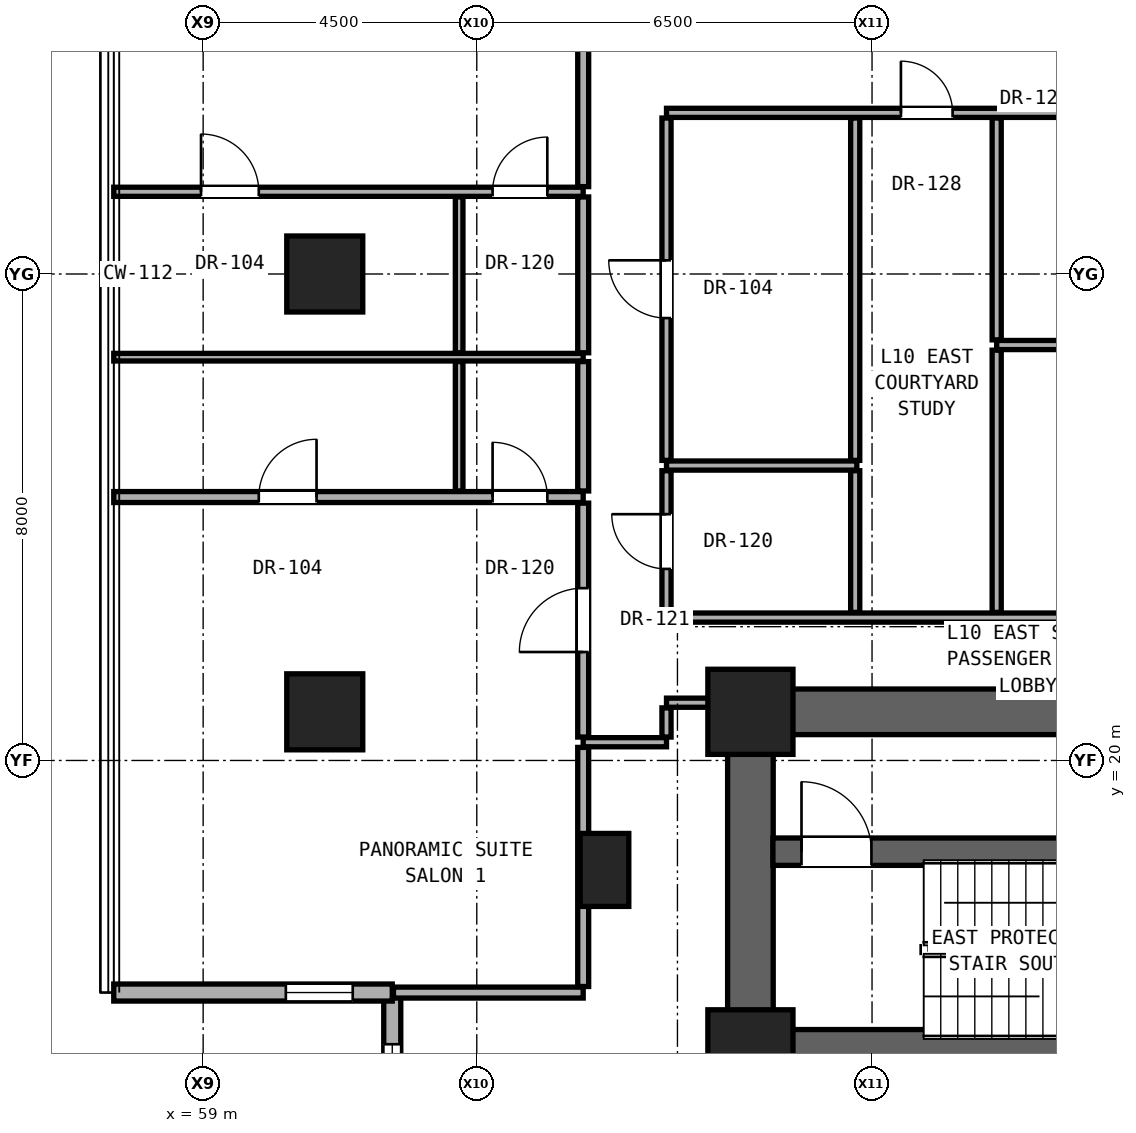
"""IFC4 building model, lengths in metres.
Left out: names, types, materials, properties, quantities, classifications, styles, units other than length and angle.
Written with IfcOpenShell. Run it as: python <this file> out.ifc"""

import sys

from ifc_helpers import new_model, si_unit, direction, frame, frame_2d, origin, origin_2d, place, context, subcontext, project, spatial, rectangle, hollow_rectangle, extrude, element, fill, save


model = new_model("IFC4")
c1 = context("Model", 3, precision=1e-05, world=origin(), true_north=direction((0.0, 1.0)))
c2 = subcontext(c1, "Body", "Model", "MODEL_VIEW")
j1 = project(units=[si_unit("LENGTHUNIT", "METRE"), si_unit("PLANEANGLEUNIT", "RADIAN")], contexts=[c1])
p1 = place(None, origin())
s1 = spatial("IfcSite", under=j1, at=p1, CompositionType="ELEMENT")
p2 = place(p1, origin())
s2 = spatial("IfcBuilding", under=s1, at=p2, CompositionType="ELEMENT")
p3 = place(p2, frame((0.0, 0.0, 38.9)))
s3 = spatial("IfcBuildingStorey", under=s2, at=p3, CompositionType="ELEMENT", Elevation=38.9)
for number, where, z_axis, x_axis in (
    (1, (68.0, 15.2, 0.0), (0.0, 0.0, 1.0), (1.0, 0.0, 0.0)),
    (2, (68.0, 20.8, 0.0), (0.0, 0.0, 1.0), (1.0, 0.0, 0.0)),
):
    element("IfcColumn", number, at=place(p3, frame(where, z_axis=z_axis, x_axis=x_axis)), inside=s3, PredefinedType="COLUMN", context=c2, shape_type="SweptSolid", body=[
        extrude(rectangle(XDim=1.4, YDim=1.4, at=origin_2d()), origin(), (0.0, 0.0, 1.0), 3.3),
    ])
for number, where, z_axis, x_axis in (
    (3, (61.0, 20.8, 0.0), (0.0, 0.0, 1.0), (1.0, 0.0, 0.0)),
    (4, (61.0, 28.0, 0.0), (0.0, 0.0, 1.0), (1.0, 0.0, 0.0)),
):
    element("IfcColumn", number, at=place(p3, frame(where, z_axis=z_axis, x_axis=x_axis)), inside=s3, PredefinedType="COLUMN", context=c2, shape_type="SweptSolid", body=[
        extrude(hollow_rectangle(XDim=1.25, YDim=1.25, WallThickness=0.07, at=origin_2d()), origin(), (0.0, 0.0, 1.0), 3.3),
    ])
p4 = place(p3, frame((65.6, 18.2, 0.0), z_axis=(0.0, 0.0, 1.0), x_axis=(1.0, 0.0, 0.0)))
e5 = element("IfcColumn", 5, at=p4, inside=s3, PredefinedType="PILASTER", context=c2, shape_type="SweptSolid", body=[
    extrude(rectangle(XDim=0.8, YDim=1.2, at=origin_2d()), origin(), (0.0, 0.0, 1.0), 3.3),
])
p5 = place(p3, frame((68.0, 15.2, 0.0), z_axis=(0.0, 0.0, 1.0), x_axis=(1.0, 0.0, 0.0)))
e6 = element("IfcWall", 6, at=p5, inside=s3, PredefinedType="SHEAR", context=c2, shape_type="SweptSolid", body=[
    extrude(rectangle(XDim=17.0, YDim=0.75, at=frame_2d((8.5, 0.0))), origin(), (0.0, 0.0, 1.0), 3.06),
])
p6 = place(p3, frame((68.0, 15.2, 0.0), z_axis=(0.0, 0.0, 1.0), x_axis=(0.0, 1.0, 0.0)))
e7 = element("IfcWall", 7, at=p6, inside=s3, PredefinedType="SHEAR", context=c2, shape_type="SweptSolid", body=[
    extrude(rectangle(XDim=5.6, YDim=0.75, at=frame_2d((2.8, 0.0))), origin(), (0.0, 0.0, 1.0), 3.06),
])
p7 = place(p3, frame((68.0, 20.8, 0.0), z_axis=(0.0, 0.0, 1.0), x_axis=(1.0, 0.0, 0.0)))
e8 = element("IfcWall", 8, at=p7, inside=s3, PredefinedType="SHEAR", context=c2, shape_type="SweptSolid", body=[
    extrude(rectangle(XDim=17.0, YDim=0.75, at=frame_2d((8.5, 0.0))), origin(), (0.0, 0.0, 1.0), 3.06),
])
p8 = place(p7, frame((9.55, 0.0, 0.0)))
e9 = element("IfcOpeningElement", 9, at=p8, cuts=e8, PredefinedType="OPENING", context=c2, shape_type="SweptSolid", body=[
    extrude(rectangle(XDim=1.3, YDim=2.3, at=frame_2d((0.65, 1.15))), frame((0.0, 0.385, 0.0), z_axis=(0.0, -1.0, 0.0), x_axis=(1.0, 0.0, 0.0)), (0.0, 0.0, 1.0), 0.77),
])
p9 = place(p7, frame((12.05, 0.0, 0.0)))
e10 = element("IfcOpeningElement", 10, at=p9, cuts=e8, PredefinedType="OPENING", context=c2, shape_type="SweptSolid", body=[
    extrude(rectangle(XDim=1.3, YDim=2.3, at=frame_2d((0.65, 1.15))), frame((0.0, 0.385, 0.0), z_axis=(0.0, -1.0, 0.0), x_axis=(1.0, 0.0, 0.0)), (0.0, 0.0, 1.0), 0.77),
])
p10 = place(p3, frame((62.11, 16.184, 0.0), z_axis=(0.0, 0.0, 1.0), x_axis=(0.0, -1.0, 0.0)))
e11 = element("IfcWall", 11, at=p10, inside=s3, PredefinedType="SOLIDWALL", context=c2, shape_type="SweptSolid", body=[
    extrude(rectangle(XDim=4.58, YDim=0.28, at=frame_2d((2.29, 0.0))), origin(), (0.0, 0.0, 1.0), 3.04),
])
p11 = place(p10, frame((0.85, 0.0, 0.79)))
e12 = element("IfcOpeningElement", 12, at=p11, cuts=e11, PredefinedType="OPENING", context=c2, shape_type="SweptSolid", body=[
    extrude(rectangle(XDim=1.5, YDim=2.1, at=frame_2d((0.75, 1.05))), frame((0.0, 0.15, 0.0), z_axis=(0.0, -1.0, 0.0), x_axis=(1.0, 0.0, 0.0)), (0.0, 0.0, 1.0), 0.3),
])
p12 = place(p3, frame((57.53, 16.184, 0.0), z_axis=(0.0, 0.0, 1.0), x_axis=(1.0, 0.0, 0.0)))
e13 = element("IfcWall", 13, at=p12, inside=s3, PredefinedType="SOLIDWALL", context=c2, shape_type="SweptSolid", body=[
    extrude(rectangle(XDim=4.58, YDim=0.28, at=frame_2d((2.29, 0.0))), origin(), (0.0, 0.0, 1.0), 3.04),
])
p13 = place(p12, frame((2.83, 0.0, 0.85)))
e14 = element("IfcOpeningElement", 14, at=p13, cuts=e13, PredefinedType="OPENING", context=c2, shape_type="SweptSolid", body=[
    extrude(rectangle(XDim=1.1, YDim=2.0, at=frame_2d((0.55, 1.0))), frame((0.0, 0.15, 0.0), z_axis=(0.0, -1.0, 0.0), x_axis=(1.0, 0.0, 0.0)), (0.0, 0.0, 1.0), 0.3),
])
p14 = place(p3, frame((62.13, 16.183, 0.0), z_axis=(0.0, 0.0, 1.0), x_axis=(1.0, 0.0, 0.0)))
e15 = element("IfcWall", 15, at=p14, inside=s3, PredefinedType="PARTITIONING", context=c2, shape_type="SweptSolid", body=[
    extrude(rectangle(XDim=3.12, YDim=0.18, at=frame_2d((1.56, 0.0))), origin(), (0.0, 0.0, 1.0), 3.06),
])
p15 = place(p3, frame((68.37, 18.5, 0.0), z_axis=(0.0, 0.0, 1.0), x_axis=(1.0, 0.0, 0.0)))
e16 = element("IfcWall", 16, at=p15, inside=s3, PredefinedType="SHEAR", context=c2, shape_type="SweptSolid", body=[
    extrude(rectangle(XDim=8.85, YDim=0.45, at=frame_2d((4.425, 0.0))), origin(), (0.0, 0.0, 1.0), 3.06),
])
p16 = place(p15, frame((0.47, 0.0, 0.0)))
e17 = element("IfcOpeningElement", 17, at=p16, cuts=e16, PredefinedType="OPENING", context=c2, shape_type="SweptSolid", body=[
    extrude(rectangle(XDim=1.15, YDim=2.2, at=frame_2d((0.575, 1.1))), frame((0.0, 0.235, 0.0), z_axis=(0.0, -1.0, 0.0), x_axis=(1.0, 0.0, 0.0)), (0.0, 0.0, 1.0), 0.47),
])
p17 = place(p3, frame((65.25, 20.3, 0.0), z_axis=(0.0, 0.0, 1.0), x_axis=(1.0, 0.0, 0.0)))
e18 = element("IfcWall", 18, at=p17, inside=s3, PredefinedType="PARTITIONING", context=c2, shape_type="SweptSolid", body=[
    extrude(rectangle(XDim=1.37, YDim=0.15, at=frame_2d((0.685, 0.0))), origin(), (0.0, 0.0, 1.0), 3.06),
])
p18 = place(p3, frame((66.62, 20.95, 0.0), z_axis=(0.0, 0.0, 1.0), x_axis=(1.0, 0.0, 0.0)))
e19 = element("IfcWall", 19, at=p18, inside=s3, PredefinedType="PARTITIONING", context=c2, shape_type="SweptSolid", body=[
    extrude(rectangle(XDim=1.01, YDim=0.15, at=frame_2d((0.505, 0.0))), origin(), (0.0, 0.0, 1.0), 2.452),
])
p19 = place(p3, frame((66.62, 22.35, 0.0), z_axis=(0.0, 0.0, 1.0), x_axis=(1.0, 0.0, 0.0)))
e20 = element("IfcWall", 20, at=p19, inside=s3, PredefinedType="PARTITIONING", context=c2, shape_type="SweptSolid", body=[
    extrude(rectangle(XDim=19.63, YDim=0.15, at=frame_2d((9.815, 0.0))), origin(), (0.0, 0.0, 1.0), 2.125),
])
p20 = place(p19, frame((12.085, 0.0, 0.0)))
e21 = element("IfcOpeningElement", 21, at=p20, cuts=e20, PredefinedType="OPENING", context=c2, shape_type="SweptSolid", body=[
    extrude(rectangle(XDim=0.85, YDim=2.01, at=frame_2d((0.425, 1.005))), frame((0.0, 0.085, 0.0), z_axis=(0.0, -1.0, 0.0), x_axis=(1.0, 0.0, 0.0)), (0.0, 0.0, 1.0), 0.17),
])
p21 = place(p3, frame((57.53, 24.332, 0.0), z_axis=(0.0, 0.0, 1.0), x_axis=(1.0, 0.0, 0.0)))
e22 = element("IfcWall", 22, at=p21, inside=s3, PredefinedType="PARTITIONING", context=c2, shape_type="SweptSolid", body=[
    extrude(rectangle(XDim=7.72, YDim=0.18, at=frame_2d((3.86, 0.0))), origin(), (0.0, 0.0, 1.0), 2.196),
])
p22 = place(p21, frame((2.385, 0.0, 0.0)))
e23 = element("IfcOpeningElement", 23, at=p22, cuts=e22, PredefinedType="OPENING", context=c2, shape_type="SweptSolid", body=[
    extrude(rectangle(XDim=0.95, YDim=2.15, at=frame_2d((0.475, 1.075))), frame((0.0, 0.1, 0.0), z_axis=(0.0, -1.0, 0.0), x_axis=(1.0, 0.0, 0.0)), (0.0, 0.0, 1.0), 0.2),
])
p23 = place(p21, frame((6.23, 0.0, 0.0)))
e24 = element("IfcOpeningElement", 24, at=p23, cuts=e22, PredefinedType="OPENING", context=c2, shape_type="SweptSolid", body=[
    extrude(rectangle(XDim=0.9, YDim=2.1, at=frame_2d((0.45, 1.05))), frame((0.0, 0.1, 0.0), z_axis=(0.0, -1.0, 0.0), x_axis=(1.0, 0.0, 0.0)), (0.0, 0.0, 1.0), 0.2),
])
p24 = place(p3, frame((66.62, 24.85, 0.0), z_axis=(0.0, 0.0, 1.0), x_axis=(1.0, 0.0, 0.0)))
e25 = element("IfcWall", 25, at=p24, inside=s3, PredefinedType="PARTITIONING", context=c2, shape_type="SweptSolid", body=[
    extrude(rectangle(XDim=3.13, YDim=0.15, at=frame_2d((1.565, 0.0))), origin(), (0.0, 0.0, 1.0), 2.125),
])
p25 = place(p3, frame((57.53, 26.632, 0.0), z_axis=(0.0, 0.0, 1.0), x_axis=(1.0, 0.0, 0.0)))
e26 = element("IfcWall", 26, at=p25, inside=s3, PredefinedType="PARTITIONING", context=c2, shape_type="SweptSolid", body=[
    extrude(rectangle(XDim=7.72, YDim=0.125, at=frame_2d((3.86, 0.0))), origin(), (0.0, 0.0, 1.0), 2.196),
])
p26 = place(p3, frame((72.05, 26.832, 0.0), z_axis=(0.0, 0.0, 1.0), x_axis=(1.0, 0.0, 0.0)))
e27 = element("IfcWall", 27, at=p26, inside=s3, PredefinedType="PARTITIONING", context=c2, shape_type="SweptSolid", body=[
    extrude(rectangle(XDim=14.2, YDim=0.15, at=frame_2d((7.1, 0.0))), origin(), (0.0, 0.0, 1.0), 2.125),
])
p27 = place(p3, frame((57.53, 29.352, 0.0), z_axis=(0.0, 0.0, 1.0), x_axis=(1.0, 0.0, 0.0)))
e28 = element("IfcWall", 28, at=p27, inside=s3, PredefinedType="PARTITIONING", context=c2, shape_type="SweptSolid", body=[
    extrude(rectangle(XDim=7.72, YDim=0.15, at=frame_2d((3.86, 0.0))), origin(), (0.0, 0.0, 1.0), 2.196),
])
p28 = place(p27, frame((1.435, 0.0, 0.0)))
e29 = element("IfcOpeningElement", 29, at=p28, cuts=e28, PredefinedType="OPENING", context=c2, shape_type="SweptSolid", body=[
    extrude(rectangle(XDim=0.95, YDim=2.15, at=frame_2d((0.475, 1.075))), frame((0.0, 0.085, 0.0), z_axis=(0.0, -1.0, 0.0), x_axis=(1.0, 0.0, 0.0)), (0.0, 0.0, 1.0), 0.17),
])
p29 = place(p27, frame((6.23, 0.0, 0.0)))
e30 = element("IfcOpeningElement", 30, at=p29, cuts=e28, PredefinedType="OPENING", context=c2, shape_type="SweptSolid", body=[
    extrude(rectangle(XDim=0.9, YDim=2.1, at=frame_2d((0.45, 1.05))), frame((0.0, 0.085, 0.0), z_axis=(0.0, -1.0, 0.0), x_axis=(1.0, 0.0, 0.0)), (0.0, 0.0, 1.0), 0.17),
])
p30 = place(p3, frame((66.62, 30.65, 0.0), z_axis=(0.0, 0.0, 1.0), x_axis=(1.0, 0.0, 0.0)))
e31 = element("IfcWall", 31, at=p30, inside=s3, PredefinedType="PARTITIONING", context=c2, shape_type="SweptSolid", body=[
    extrude(rectangle(XDim=19.63, YDim=0.15, at=frame_2d((9.815, 0.0))), origin(), (0.0, 0.0, 1.0), 2.125),
])
p31 = place(p30, frame((3.855, 0.0, 0.0)))
e32 = element("IfcOpeningElement", 32, at=p31, cuts=e31, PredefinedType="OPENING", context=c2, shape_type="SweptSolid", body=[
    extrude(rectangle(XDim=0.85, YDim=2.01, at=frame_2d((0.425, 1.005))), frame((0.0, 0.085, 0.0), z_axis=(0.0, -1.0, 0.0), x_axis=(1.0, 0.0, 0.0)), (0.0, 0.0, 1.0), 0.17),
])
p32 = place(p30, frame((12.085, 0.0, 0.0)))
e33 = element("IfcOpeningElement", 33, at=p32, cuts=e31, PredefinedType="OPENING", context=c2, shape_type="SweptSolid", body=[
    extrude(rectangle(XDim=0.85, YDim=2.01, at=frame_2d((0.425, 1.005))), frame((0.0, 0.085, 0.0), z_axis=(0.0, -1.0, 0.0), x_axis=(1.0, 0.0, 0.0)), (0.0, 0.0, 1.0), 0.17),
])
p33 = place(p3, frame((63.21, 24.432, 0.0), z_axis=(0.0, 0.0, 1.0), x_axis=(0.0, 1.0, 0.0)))
e34 = element("IfcWall", 34, at=p33, inside=s3, PredefinedType="PARTITIONING", context=c2, shape_type="SweptSolid", body=[
    extrude(rectangle(XDim=2.128, YDim=0.125, at=frame_2d((1.064, 0.0))), origin(), (0.0, 0.0, 1.0), 3.06),
])
p34 = place(p3, frame((63.21, 26.705, 0.0), z_axis=(0.0, 0.0, 1.0), x_axis=(0.0, 1.0, 0.0)))
e35 = element("IfcWall", 35, at=p34, inside=s3, PredefinedType="PARTITIONING", context=c2, shape_type="SweptSolid", body=[
    extrude(rectangle(XDim=2.562, YDim=0.125, at=frame_2d((1.281, 0.0))), origin(), (0.0, 0.0, 1.0), 2.279),
])
p35 = place(p3, frame((65.25, 16.283, 0.0), z_axis=(0.0, 0.0, 1.0), x_axis=(0.0, 1.0, 0.0)))
e36 = element("IfcWall", 36, at=p35, inside=s3, PredefinedType="PARTITIONING", context=c2, shape_type="SweptSolid", body=[
    extrude(rectangle(XDim=3.932, YDim=0.18, at=frame_2d((1.966, 0.0))), origin(), (0.0, 0.0, 1.0), 2.436),
])
p36 = place(p3, frame((65.25, 20.385, 0.0), z_axis=(0.0, 0.0, 1.0), x_axis=(0.0, 1.0, 0.0)))
e37 = element("IfcWall", 37, at=p36, inside=s3, PredefinedType="PARTITIONING", context=c2, shape_type="SweptSolid", body=[
    extrude(rectangle(XDim=3.847, YDim=0.18, at=frame_2d((1.923, 0.0))), origin(), (0.0, 0.0, 1.0), 2.452),
])
p37 = place(p36, frame((1.398, 0.0, 0.0)))
e38 = element("IfcOpeningElement", 38, at=p37, cuts=e37, PredefinedType="OPENING", context=c2, shape_type="SweptSolid", body=[
    extrude(rectangle(XDim=1.05, YDim=2.2, at=frame_2d((0.525, 1.1))), frame((0.0, 0.1, 0.0), z_axis=(0.0, -1.0, 0.0), x_axis=(1.0, 0.0, 0.0)), (0.0, 0.0, 1.0), 0.2),
])
p38 = place(p3, frame((65.25, 24.432, 0.0), z_axis=(0.0, 0.0, 1.0), x_axis=(0.0, 1.0, 0.0)))
e39 = element("IfcWall", 39, at=p38, inside=s3, PredefinedType="PARTITIONING", context=c2, shape_type="SweptSolid", body=[
    extrude(rectangle(XDim=2.128, YDim=0.18, at=frame_2d((1.064, 0.0))), origin(), (0.0, 0.0, 1.0), 3.06),
])
p39 = place(p3, frame((65.25, 26.705, 0.0), z_axis=(0.0, 0.0, 1.0), x_axis=(0.0, 1.0, 0.0)))
e40 = element("IfcWall", 40, at=p39, inside=s3, PredefinedType="PARTITIONING", context=c2, shape_type="SweptSolid", body=[
    extrude(rectangle(XDim=2.562, YDim=0.18, at=frame_2d((1.281, 0.0))), origin(), (0.0, 0.0, 1.0), 2.279),
])
p40 = place(p3, frame((65.25, 29.437, 0.0), z_axis=(0.0, 0.0, 1.0), x_axis=(0.0, 1.0, 0.0)))
e41 = element("IfcWall", 41, at=p40, inside=s3, PredefinedType="PARTITIONING", context=c2, shape_type="SweptSolid", body=[
    extrude(rectangle(XDim=6.178, YDim=0.18, at=frame_2d((3.089, 0.0))), origin(), (0.0, 0.0, 1.0), 2.452),
])
p41 = place(p40, frame((2.564, 0.0, 0.0)))
e42 = element("IfcOpeningElement", 42, at=p41, cuts=e41, PredefinedType="OPENING", context=c2, shape_type="SweptSolid", body=[
    extrude(rectangle(XDim=1.05, YDim=2.2, at=frame_2d((0.525, 1.1))), frame((0.0, 0.1, 0.0), z_axis=(0.0, -1.0, 0.0), x_axis=(1.0, 0.0, 0.0)), (0.0, 0.0, 1.0), 0.2),
])
p42 = place(p3, frame((66.62, 20.385, 0.0), z_axis=(0.0, 0.0, 1.0), x_axis=(0.0, 1.0, 0.0)))
e43 = element("IfcWall", 43, at=p42, inside=s3, PredefinedType="PARTITIONING", context=c2, shape_type="SweptSolid", body=[
    extrude(rectangle(XDim=0.48, YDim=0.15, at=frame_2d((0.24, 0.0))), origin(), (0.0, 0.0, 1.0), 2.452),
])
p43 = place(p3, frame((66.62, 22.435, 0.0), z_axis=(0.0, 0.0, 1.0), x_axis=(0.0, 1.0, 0.0)))
e44 = element("IfcWall", 44, at=p43, inside=s3, PredefinedType="PARTITIONING", context=c2, shape_type="SweptSolid", body=[
    extrude(rectangle(XDim=2.33, YDim=0.15, at=frame_2d((1.165, 0.0))), origin(), (0.0, 0.0, 1.0), 3.06),
])
p44 = place(p43, frame((0.715, 0.0, 0.0)))
e45 = element("IfcOpeningElement", 45, at=p44, cuts=e44, PredefinedType="OPENING", context=c2, shape_type="SweptSolid", body=[
    extrude(rectangle(XDim=0.9, YDim=2.1, at=frame_2d((0.45, 1.05))), frame((0.0, 0.085, 0.0), z_axis=(0.0, -1.0, 0.0), x_axis=(1.0, 0.0, 0.0)), (0.0, 0.0, 1.0), 0.17),
])
p45 = place(p3, frame((66.62, 24.935, 0.0), z_axis=(0.0, 0.0, 1.0), x_axis=(0.0, 1.0, 0.0)))
e46 = element("IfcWall", 46, at=p45, inside=s3, PredefinedType="PARTITIONING", context=c2, shape_type="SweptSolid", body=[
    extrude(rectangle(XDim=5.63, YDim=0.15, at=frame_2d((2.815, 0.0))), origin(), (0.0, 0.0, 1.0), 2.279),
])
p46 = place(p45, frame((2.34, 0.0, 0.0)))
e47 = element("IfcOpeningElement", 47, at=p46, cuts=e46, PredefinedType="OPENING", context=c2, shape_type="SweptSolid", body=[
    extrude(rectangle(XDim=0.95, YDim=2.15, at=frame_2d((0.475, 1.075))), frame((0.0, 0.085, 0.0), z_axis=(0.0, -1.0, 0.0), x_axis=(1.0, 0.0, 0.0)), (0.0, 0.0, 1.0), 0.17),
])
p47 = place(p3, frame((69.723, 22.435, 0.0), z_axis=(0.0, 0.0, 1.0), x_axis=(0.0, 1.0, 0.0)))
e48 = element("IfcWall", 48, at=p47, inside=s3, PredefinedType="PARTITIONING", context=c2, shape_type="SweptSolid", body=[
    extrude(rectangle(XDim=2.33, YDim=0.15, at=frame_2d((1.165, 0.0))), origin(), (0.0, 0.0, 1.0), 3.06),
])
p48 = place(p3, frame((69.723, 24.935, 0.0), z_axis=(0.0, 0.0, 1.0), x_axis=(0.0, 1.0, 0.0)))
e49 = element("IfcWall", 49, at=p48, inside=s3, PredefinedType="PARTITIONING", context=c2, shape_type="SweptSolid", body=[
    extrude(rectangle(XDim=5.63, YDim=0.15, at=frame_2d((2.815, 0.0))), origin(), (0.0, 0.0, 1.0), 2.125),
])
p49 = place(p3, frame((72.05, 22.435, 0.0), z_axis=(0.0, 0.0, 1.0), x_axis=(0.0, 1.0, 0.0)))
e50 = element("IfcWall", 50, at=p49, inside=s3, PredefinedType="PARTITIONING", context=c2, shape_type="SweptSolid", body=[
    extrude(rectangle(XDim=4.312, YDim=0.15, at=frame_2d((2.156, 0.0))), origin(), (0.0, 0.0, 1.0), 2.589),
])
p50 = place(p3, frame((72.05, 26.917, 0.0), z_axis=(0.0, 0.0, 1.0), x_axis=(0.0, 1.0, 0.0)))
e51 = element("IfcWall", 51, at=p50, inside=s3, PredefinedType="PARTITIONING", context=c2, shape_type="SweptSolid", body=[
    extrude(rectangle(XDim=3.648, YDim=0.15, at=frame_2d((1.824, 0.0))), origin(), (0.0, 0.0, 1.0), 2.125),
])
p51 = place(p11, origin())
e52 = element("IfcWindow", 52, at=p51, inside=s3, PartitioningType="SINGLE_PANEL", PredefinedType="WINDOW", context=c2, shape_type="SweptSolid", body=[
    extrude(rectangle(XDim=1.5, YDim=2.1, at=frame_2d((0.75, 1.05))), frame((0.0, 0.03, 0.0), z_axis=(0.0, -1.0, 0.0), x_axis=(1.0, 0.0, 0.0)), (0.0, 0.0, 1.0), 0.06),
])
fill(e12, e52)
p52 = place(p13, origin())
e53 = element("IfcWindow", 53, at=p52, inside=s3, PartitioningType="SINGLE_PANEL", PredefinedType="WINDOW", context=c2, shape_type="SweptSolid", body=[
    extrude(rectangle(XDim=1.1, YDim=2.0, at=frame_2d((0.55, 1.0))), frame((0.0, 0.03, 0.0), z_axis=(0.0, -1.0, 0.0), x_axis=(1.0, 0.0, 0.0)), (0.0, 0.0, 1.0), 0.06),
])
fill(e14, e53)
p53 = place(p16, origin())
e54 = element("IfcDoor", 54, at=p53, inside=s3, OperationType="SINGLE_SWING_LEFT", PredefinedType="DOOR", context=c2, shape_type="SweptSolid", body=[
    extrude(rectangle(XDim=1.15, YDim=2.2, at=frame_2d((0.575, 1.1))), frame((0.0, 0.025, 0.0), z_axis=(0.0, -1.0, 0.0), x_axis=(1.0, 0.0, 0.0)), (0.0, 0.0, 1.0), 0.05),
])
fill(e17, e54)
p54 = place(p44, origin())
e55 = element("IfcDoor", 55, at=p54, inside=s3, OperationType="SINGLE_SWING_RIGHT", PredefinedType="DOOR", context=c2, shape_type="SweptSolid", body=[
    extrude(rectangle(XDim=0.9, YDim=2.1, at=frame_2d((0.45, 1.05))), frame((0.0, 0.025, 0.0), z_axis=(0.0, -1.0, 0.0), x_axis=(1.0, 0.0, 0.0)), (0.0, 0.0, 1.0), 0.05),
])
fill(e45, e55)
p55 = place(p37, origin())
e56 = element("IfcDoor", 56, at=p55, inside=s3, OperationType="SINGLE_SWING_LEFT", PredefinedType="DOOR", context=c2, shape_type="SweptSolid", body=[
    extrude(rectangle(XDim=1.05, YDim=2.2, at=frame_2d((0.525, 1.1))), frame((0.0, 0.025, 0.0), z_axis=(0.0, -1.0, 0.0), x_axis=(1.0, 0.0, 0.0)), (0.0, 0.0, 1.0), 0.05),
])
fill(e38, e56)
p56 = place(p22, origin())
e57 = element("IfcDoor", 57, at=p56, inside=s3, OperationType="SINGLE_SWING_RIGHT", PredefinedType="DOOR", context=c2, shape_type="SweptSolid", body=[
    extrude(rectangle(XDim=0.95, YDim=2.15, at=frame_2d((0.475, 1.075))), frame((0.0, 0.025, 0.0), z_axis=(0.0, -1.0, 0.0), x_axis=(1.0, 0.0, 0.0)), (0.0, 0.0, 1.0), 0.05),
])
fill(e23, e57)
p57 = place(p23, origin())
e58 = element("IfcDoor", 58, at=p57, inside=s3, OperationType="SINGLE_SWING_LEFT", PredefinedType="DOOR", context=c2, shape_type="SweptSolid", body=[
    extrude(rectangle(XDim=0.9, YDim=2.1, at=frame_2d((0.45, 1.05))), frame((0.0, 0.025, 0.0), z_axis=(0.0, -1.0, 0.0), x_axis=(1.0, 0.0, 0.0)), (0.0, 0.0, 1.0), 0.05),
])
fill(e24, e58)
p58 = place(p28, origin())
e59 = element("IfcDoor", 59, at=p58, inside=s3, OperationType="SINGLE_SWING_LEFT", PredefinedType="DOOR", context=c2, shape_type="SweptSolid", body=[
    extrude(rectangle(XDim=0.95, YDim=2.15, at=frame_2d((0.475, 1.075))), frame((0.0, 0.025, 0.0), z_axis=(0.0, -1.0, 0.0), x_axis=(1.0, 0.0, 0.0)), (0.0, 0.0, 1.0), 0.05),
])
fill(e29, e59)
p59 = place(p29, origin())
e60 = element("IfcDoor", 60, at=p59, inside=s3, OperationType="SINGLE_SWING_RIGHT", PredefinedType="DOOR", context=c2, shape_type="SweptSolid", body=[
    extrude(rectangle(XDim=0.9, YDim=2.1, at=frame_2d((0.45, 1.05))), frame((0.0, 0.025, 0.0), z_axis=(0.0, -1.0, 0.0), x_axis=(1.0, 0.0, 0.0)), (0.0, 0.0, 1.0), 0.05),
])
fill(e30, e60)
p60 = place(p46, origin())
e61 = element("IfcDoor", 61, at=p60, inside=s3, OperationType="SINGLE_SWING_RIGHT", PredefinedType="DOOR", context=c2, shape_type="SweptSolid", body=[
    extrude(rectangle(XDim=0.95, YDim=2.15, at=frame_2d((0.475, 1.075))), frame((0.0, 0.025, 0.0), z_axis=(0.0, -1.0, 0.0), x_axis=(1.0, 0.0, 0.0)), (0.0, 0.0, 1.0), 0.05),
])
fill(e47, e61)
p61 = place(p31, origin())
e62 = element("IfcDoor", 62, at=p61, inside=s3, OperationType="SINGLE_SWING_LEFT", PredefinedType="DOOR", context=c2, shape_type="SweptSolid", body=[
    extrude(rectangle(XDim=0.85, YDim=2.01, at=frame_2d((0.425, 1.005))), frame((0.0, 0.025, 0.0), z_axis=(0.0, -1.0, 0.0), x_axis=(1.0, 0.0, 0.0)), (0.0, 0.0, 1.0), 0.05),
])
fill(e32, e62)
save(model, sys.argv[1])
